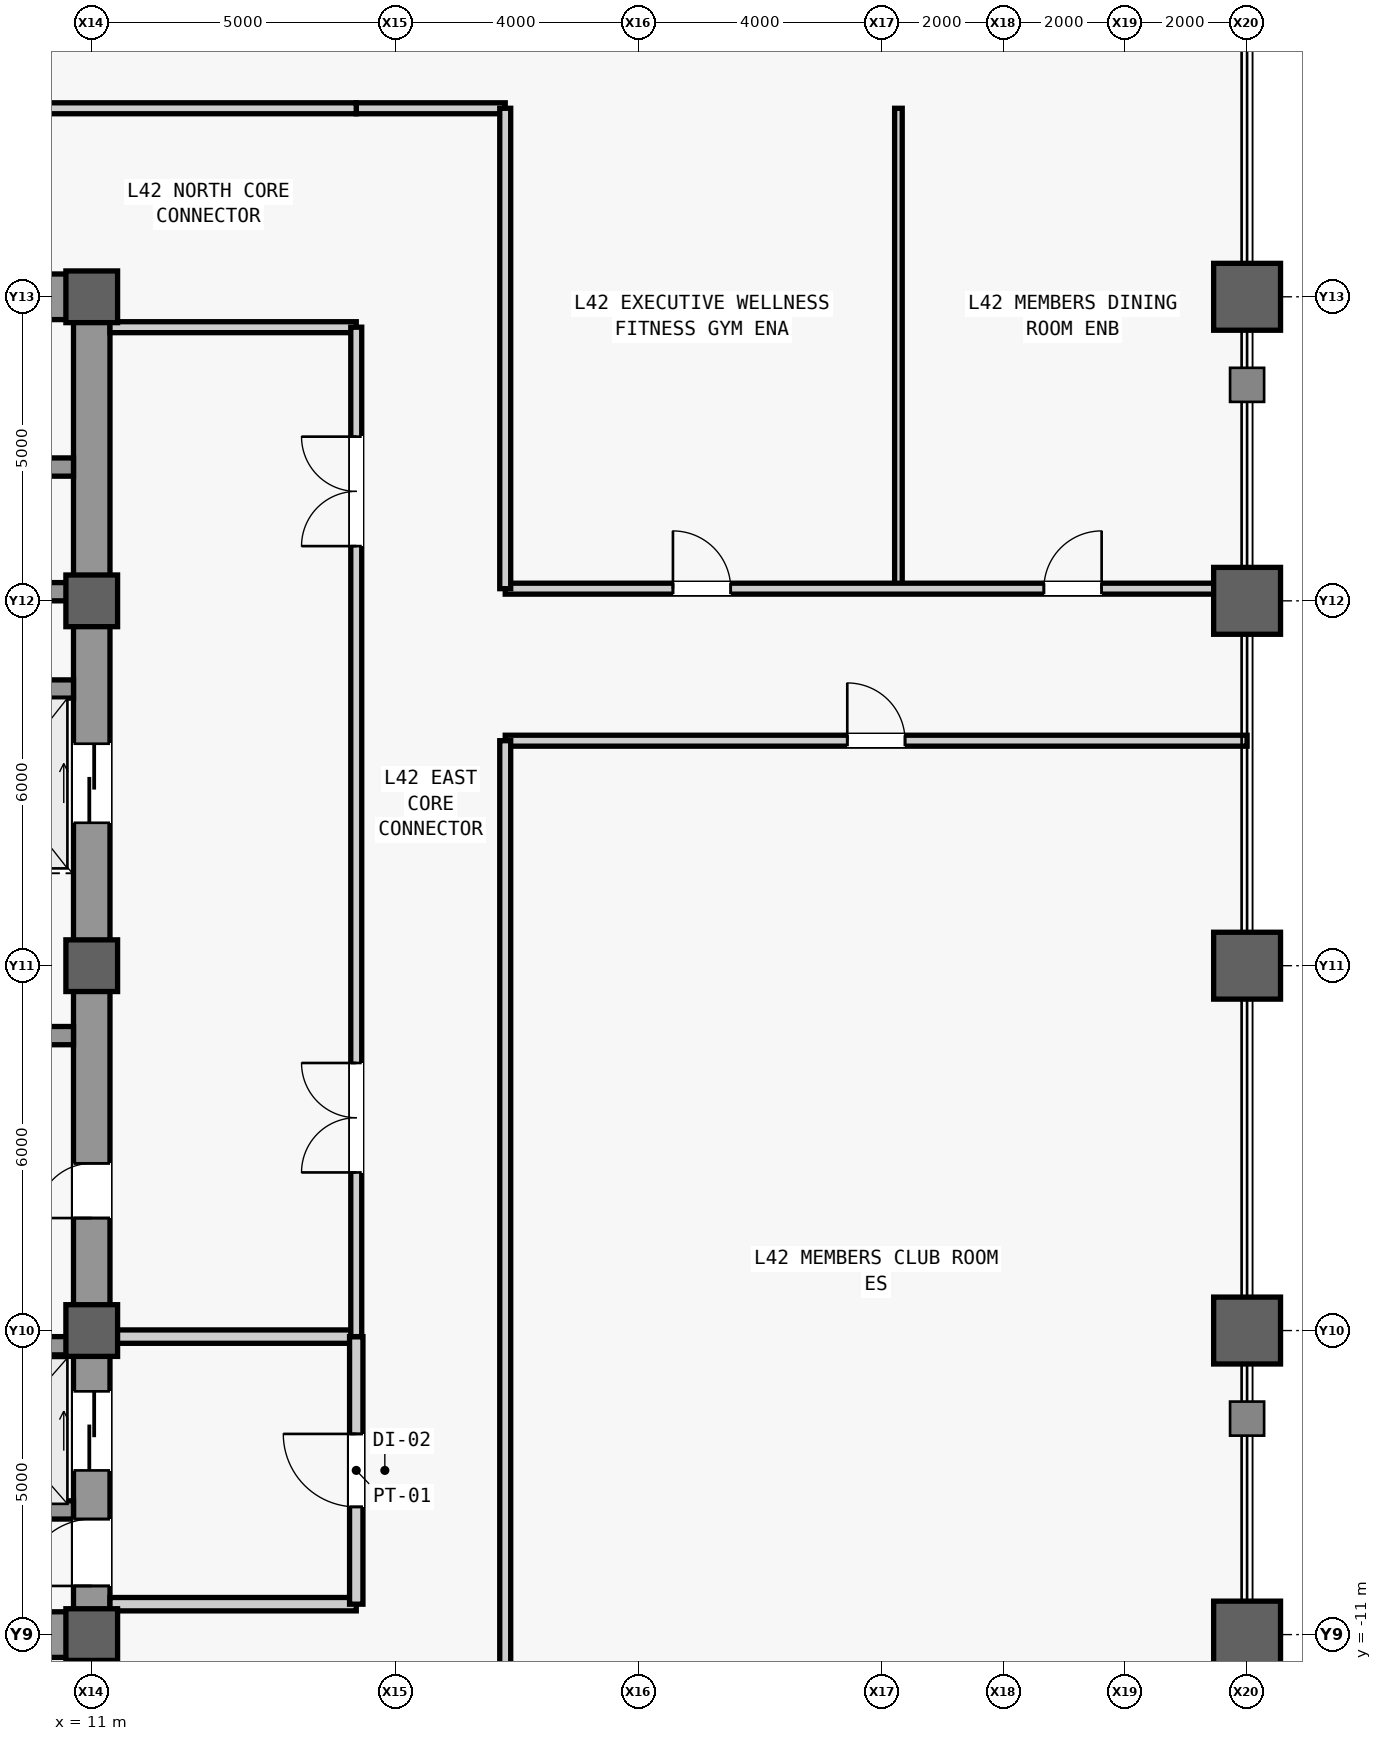
"""IFC4 building model, lengths in metres.
Left out: names, types, materials, properties, quantities, classifications, styles, units other than length and angle.
Written with IfcOpenShell. Run it as: python <this file> out.ifc"""

import sys

from ifc_helpers import new_model, si_unit, direction, frame, frame_2d, origin, origin_2d, place, context, subcontext, project, spatial, rectangle, hollow_rectangle, extrude, source, transform, mapped, element, fill, save


model = new_model("IFC4")
c1 = context("Model", 3, precision=1e-05, world=origin(), true_north=direction((0.0, 1.0)))
c2 = subcontext(c1, "Body", "Model", "MODEL_VIEW")
j1 = project(units=[si_unit("LENGTHUNIT", "METRE"), si_unit("PLANEANGLEUNIT", "RADIAN")], contexts=[c1])
p1 = place(None, origin())
s1 = spatial("IfcSite", under=j1, at=p1, CompositionType="ELEMENT")
p2 = place(p1, origin())
s2 = spatial("IfcBuilding", under=s1, at=p2, CompositionType="ELEMENT")
p3 = place(p2, frame((0.0, 0.0, 183.1)))
s3 = spatial("IfcBuildingStorey", under=s2, at=p3, CompositionType="ELEMENT", Elevation=183.1)
m1 = source(origin(), c2, "Body", "SweptSolid", [
    extrude(rectangle(XDim=22.0, YDim=0.6, at=frame_2d((11.0, 0.0))), origin(), (0.0, 0.0, 1.0), 3.78),
])
p4 = place(p3, frame((11.0, -11.0, 0.0), z_axis=(0.0, 0.0, 1.0), x_axis=(0.0, 1.0, 0.0)))
e1 = element("IfcWall", 1, at=p4, inside=s3, PredefinedType="SHEAR", context=c2, shape_type="MappedRepresentation", body=[
    mapped(m1, transform((0.0, 0.0, 0.0), scale=1.0)),
])
m2 = source(origin(), c2, "Body", "SweptSolid", [
    extrude(rectangle(XDim=1.1, YDim=2.2, at=frame_2d((0.55, 1.1))), frame((0.0, 0.31, 0.0), z_axis=(0.0, -1.0, 0.0), x_axis=(1.0, 0.0, 0.0)), (0.0, 0.0, 1.0), 0.62),
])
p5 = place(p4, frame((0.8, 0.0, 0.0)))
e2 = element("IfcOpeningElement", 2, at=p5, cuts=e1, PredefinedType="OPENING", context=c2, shape_type="MappedRepresentation", body=[
    mapped(m2, transform((0.0, 0.0, 0.0), scale=1.0)),
])
m3 = source(origin(), c2, "Body", "SweptSolid", [
    extrude(rectangle(XDim=0.9, YDim=2.15, at=frame_2d((0.45, 1.075))), frame((0.0, 0.31, 0.0), z_axis=(0.0, -1.0, 0.0), x_axis=(1.0, 0.0, 0.0)), (0.0, 0.0, 1.0), 0.62),
])
p6 = place(p4, frame((6.85, 0.0, 0.0)))
e3 = element("IfcOpeningElement", 3, at=p6, cuts=e1, PredefinedType="OPENING", context=c2, shape_type="MappedRepresentation", body=[
    mapped(m3, transform((0.0, 0.0, 0.0), scale=1.0)),
])
m4 = source(origin(), c2, "Body", "SweptSolid", [
    extrude(rectangle(XDim=1.3, YDim=2.3, at=frame_2d((0.65, 1.15))), frame((0.0, 0.31, 0.0), z_axis=(0.0, -1.0, 0.0), x_axis=(1.0, 0.0, 0.0)), (0.0, 0.0, 1.0), 0.62),
])
p7 = place(p4, frame((2.7, 0.0, 0.0)))
e4 = element("IfcOpeningElement", 4, at=p7, cuts=e1, PredefinedType="OPENING", context=c2, shape_type="MappedRepresentation", body=[
    mapped(m4, transform((0.0, 0.0, 0.0), scale=1.0)),
])
p8 = place(p4, frame((13.35, 0.0, 0.0)))
e5 = element("IfcOpeningElement", 5, at=p8, cuts=e1, PredefinedType="OPENING", context=c2, shape_type="MappedRepresentation", body=[
    mapped(m4, transform((0.0, 0.0, 0.0), scale=1.0)),
])
m5 = source(origin(), c2, "Body", "SweptSolid", [
    extrude(rectangle(XDim=5.85, YDim=0.75, at=frame_2d((2.925, 0.0))), origin(), (0.0, 0.0, 1.0), 3.78),
])
p9 = place(p3, frame((4.85, -11.0, 0.0), z_axis=(0.0, 0.0, 1.0), x_axis=(1.0, 0.0, 0.0)))
e6 = element("IfcWall", 6, at=p9, inside=s3, PredefinedType="SHEAR", context=c2, shape_type="MappedRepresentation", body=[
    mapped(m5, transform((0.0, 0.0, 0.0), scale=1.0)),
])
p10 = place(p3, frame((4.85, 11.0, 0.0), z_axis=(0.0, 0.0, 1.0), x_axis=(1.0, 0.0, 0.0)))
e7 = element("IfcWall", 7, at=p10, inside=s3, PredefinedType="SHEAR", context=c2, shape_type="MappedRepresentation", body=[
    mapped(m5, transform((0.0, 0.0, 0.0), scale=1.0)),
])
m6 = source(origin(), c2, "Body", "SweptSolid", [
    extrude(rectangle(XDim=1.05, YDim=2.2, at=frame_2d((0.525, 1.1))), frame((0.0, 0.385, 0.0), z_axis=(0.0, -1.0, 0.0), x_axis=(1.0, 0.0, 0.0)), (0.0, 0.0, 1.0), 0.77),
])
p11 = place(p10, frame((1.375, 0.0, 0.0)))
e8 = element("IfcOpeningElement", 8, at=p11, cuts=e7, PredefinedType="OPENING", context=c2, shape_type="MappedRepresentation", body=[
    mapped(m6, transform((0.0, 0.0, 0.0), scale=1.0)),
])
m7 = source(origin(), c2, "Body", "SweptSolid", [
    extrude(rectangle(XDim=5.6, YDim=0.3, at=frame_2d((2.8, 0.0))), origin(), (0.0, 0.0, 1.0), 3.78),
])
p12 = place(p3, frame((5.1, -1.15, 0.0), z_axis=(0.0, 0.0, 1.0), x_axis=(1.0, 0.0, 0.0)))
e9 = element("IfcWall", 9, at=p12, inside=s3, PredefinedType="SHEAR", context=c2, shape_type="MappedRepresentation", body=[
    mapped(m7, transform((0.0, 0.0, 0.0), scale=1.0)),
])
m8 = source(origin(), c2, "Body", "SweptSolid", [
    extrude(rectangle(XDim=0.85, YDim=0.85, at=origin_2d()), origin(), (0.0, 0.0, 1.0), 4.0),
])
for number, where, z_axis, x_axis in (
    (10, (11.0, -11.0, 0.0), (0.0, 0.0, 1.0), (1.0, 0.0, 0.0)),
    (11, (11.0, -6.0, 0.0), (0.0, 0.0, 1.0), (1.0, 0.0, 0.0)),
    (12, (11.0, 0.0, 0.0), (0.0, 0.0, 1.0), (1.0, 0.0, 0.0)),
    (13, (11.0, 6.0, 0.0), (0.0, 0.0, 1.0), (1.0, 0.0, 0.0)),
    (14, (11.0, 11.0, 0.0), (0.0, 0.0, 1.0), (1.0, 0.0, 0.0)),
):
    element("IfcColumn", number, at=place(p3, frame(where, z_axis=z_axis, x_axis=x_axis)), inside=s3, PredefinedType="COLUMN", context=c2, shape_type="MappedRepresentation", body=[
        mapped(m8, transform((0.0, 0.0, 0.0), scale=1.0)),
    ])
m9 = source(origin(), c2, "Body", "SweptSolid", [
    extrude(hollow_rectangle(XDim=1.1, YDim=1.1, WallThickness=0.06, at=origin_2d()), origin(), (0.0, 0.0, 1.0), 4.0),
])
for number, where, z_axis, x_axis in (
    (15, (30.0, -11.0, 0.0), (0.0, 0.0, 1.0), (1.0, 0.0, 0.0)),
    (16, (30.0, -6.0, 0.0), (0.0, 0.0, 1.0), (1.0, 0.0, 0.0)),
    (17, (30.0, 0.0, 0.0), (0.0, 0.0, 1.0), (1.0, 0.0, 0.0)),
    (18, (30.0, 6.0, 0.0), (0.0, 0.0, 1.0), (1.0, 0.0, 0.0)),
    (19, (30.0, 11.0, 0.0), (0.0, 0.0, 1.0), (1.0, 0.0, 0.0)),
):
    element("IfcColumn", number, at=place(p3, frame(where, z_axis=z_axis, x_axis=x_axis)), inside=s3, PredefinedType="COLUMN", context=c2, shape_type="MappedRepresentation", body=[
        mapped(m9, transform((0.0, 0.0, 0.0), scale=1.0)),
    ])
m10 = source(origin(), c2, "Body", "SweptSolid", [
    extrude(rectangle(XDim=2.2, YDim=0.3, at=frame_2d((1.1, 0.0))), origin(), (0.0, 0.0, 1.0), 3.78),
])
for number, where, z_axis, x_axis in (
    (20, (8.5, -8.95, 0.0), (0.0, 0.0, 1.0), (1.0, 0.0, 0.0)),
    (21, (8.5, -6.25, 0.0), (0.0, 0.0, 1.0), (1.0, 0.0, 0.0)),
):
    element("IfcWall", number, at=place(p3, frame(where, z_axis=z_axis, x_axis=x_axis)), inside=s3, PredefinedType="SHEAR", context=c2, shape_type="MappedRepresentation", body=[
        mapped(m10, transform((0.0, 0.0, 0.0), scale=1.0)),
    ])
m11 = source(origin(), c2, "Body", "SweptSolid", [
    extrude(rectangle(XDim=2.3, YDim=0.3, at=frame_2d((1.15, 0.0))), origin(), (0.0, 0.0, 1.0), 3.78),
])
for number, where, z_axis, x_axis in (
    (22, (8.4, 4.55, 0.0), (0.0, 0.0, 1.0), (1.0, 0.0, 0.0)),
    (23, (8.4, 6.15, 0.0), (0.0, 0.0, 1.0), (1.0, 0.0, 0.0)),
    (24, (8.4, 8.2, 0.0), (0.0, 0.0, 1.0), (1.0, 0.0, 0.0)),
):
    element("IfcWall", number, at=place(p3, frame(where, z_axis=z_axis, x_axis=x_axis)), inside=s3, PredefinedType="SHEAR", context=c2, shape_type="MappedRepresentation", body=[
        mapped(m11, transform((0.0, 0.0, 0.0), scale=1.0)),
    ])
m12 = source(origin(), c2, "Body", "SweptSolid", [
    extrude(rectangle(XDim=4.05, YDim=0.22, at=frame_2d((2.025, 0.0))), origin(), (0.0, 0.0, 1.0), 3.78),
])
p13 = place(p3, frame((11.3, -10.5, 0.0), z_axis=(0.0, 0.0, 1.0), x_axis=(1.0, 0.0, 0.0)))
e25 = element("IfcWall", 25, at=p13, inside=s3, PredefinedType="PARTITIONING", context=c2, shape_type="MappedRepresentation", body=[
    mapped(m12, transform((0.0, 0.0, 0.0), scale=1.0)),
])
m13 = source(origin(), c2, "Body", "SweptSolid", [
    extrude(rectangle(XDim=4.05, YDim=0.22, at=frame_2d((2.025, 0.0))), origin(), (0.0, 0.0, 1.0), 3.007),
])
p14 = place(p3, frame((11.3, -6.1, 0.0), z_axis=(0.0, 0.0, 1.0), x_axis=(1.0, 0.0, 0.0)))
e26 = element("IfcWall", 26, at=p14, inside=s3, PredefinedType="PARTITIONING", context=c2, shape_type="MappedRepresentation", body=[
    mapped(m13, transform((0.0, 0.0, 0.0), scale=1.0)),
])
m14 = source(origin(), c2, "Body", "SweptSolid", [
    extrude(rectangle(XDim=4.4, YDim=0.22, at=frame_2d((2.2, 0.0))), origin(), (0.0, 0.0, 1.0), 3.78),
])
p15 = place(p3, frame((15.35, -10.5, 0.0), z_axis=(0.0, 0.0, 1.0), x_axis=(0.0, 1.0, 0.0)))
e27 = element("IfcWall", 27, at=p15, inside=s3, PredefinedType="PARTITIONING", context=c2, shape_type="MappedRepresentation", body=[
    mapped(m14, transform((0.0, 0.0, 0.0), scale=1.0)),
])
m15 = source(origin(), c2, "Body", "SweptSolid", [
    extrude(rectangle(XDim=1.2, YDim=2.2, at=frame_2d((0.6, 1.1))), frame((0.0, 0.12, 0.0), z_axis=(0.0, -1.0, 0.0), x_axis=(1.0, 0.0, 0.0)), (0.0, 0.0, 1.0), 0.24),
])
p16 = place(p15, frame((1.6, 0.0, 0.0)))
e28 = element("IfcOpeningElement", 28, at=p16, cuts=e27, PredefinedType="OPENING", context=c2, shape_type="MappedRepresentation", body=[
    mapped(m15, transform((0.0, 0.0, 0.0), scale=1.0)),
])
m16 = source(origin(), c2, "Body", "SweptSolid", [
    extrude(rectangle(XDim=4.05, YDim=0.18, at=frame_2d((2.025, 0.0))), origin(), (0.0, 0.0, 1.0), 3.78),
])
p17 = place(p3, frame((11.3, 10.5, 0.0), z_axis=(0.0, 0.0, 1.0), x_axis=(1.0, 0.0, 0.0)))
e29 = element("IfcWall", 29, at=p17, inside=s3, PredefinedType="PARTITIONING", context=c2, shape_type="MappedRepresentation", body=[
    mapped(m16, transform((0.0, 0.0, 0.0), scale=1.0)),
])
m17 = source(origin(), c2, "Body", "SweptSolid", [
    extrude(rectangle(XDim=16.6, YDim=0.18, at=frame_2d((8.3, 0.0))), origin(), (0.0, 0.0, 1.0), 3.78),
])
p18 = place(p3, frame((15.35, -6.1, 0.0), z_axis=(0.0, 0.0, 1.0), x_axis=(0.0, 1.0, 0.0)))
e30 = element("IfcWall", 30, at=p18, inside=s3, PredefinedType="PARTITIONING", context=c2, shape_type="MappedRepresentation", body=[
    mapped(m17, transform((0.0, 0.0, 0.0), scale=1.0)),
])
m18 = source(origin(), c2, "Body", "SweptSolid", [
    extrude(rectangle(XDim=1.8, YDim=2.25, at=frame_2d((0.9, 1.125))), frame((0.0, 0.1, 0.0), z_axis=(0.0, -1.0, 0.0), x_axis=(1.0, 0.0, 0.0)), (0.0, 0.0, 1.0), 0.2),
])
p19 = place(p18, frame((2.7, 0.0, 0.0)))
e31 = element("IfcOpeningElement", 31, at=p19, cuts=e30, PredefinedType="OPENING", context=c2, shape_type="MappedRepresentation", body=[
    mapped(m18, transform((0.0, 0.0, 0.0), scale=1.0)),
])
p20 = place(p18, frame((13.0, 0.0, 0.0)))
e32 = element("IfcOpeningElement", 32, at=p20, cuts=e30, PredefinedType="OPENING", context=c2, shape_type="MappedRepresentation", body=[
    mapped(m18, transform((0.0, 0.0, 0.0), scale=1.0)),
])
m19 = source(origin(), c2, "Body", "SweptSolid", [
    extrude(rectangle(XDim=2.45, YDim=0.18, at=frame_2d((1.225, 0.0))), origin(), (0.0, 0.0, 1.0), 3.78),
])
p21 = place(p3, frame((15.35, 14.1, 0.0), z_axis=(0.0, 0.0, 1.0), x_axis=(1.0, 0.0, 0.0)))
e33 = element("IfcWall", 33, at=p21, inside=s3, PredefinedType="PARTITIONING", context=c2, shape_type="MappedRepresentation", body=[
    mapped(m19, transform((0.0, 0.0, 0.0), scale=1.0)),
])
m20 = source(origin(), c2, "Body", "SweptSolid", [
    extrude(rectangle(XDim=6.05, YDim=0.18, at=frame_2d((3.025, 0.0))), origin(), (0.0, 0.0, 1.0), 3.78),
])
p22 = place(p3, frame((9.3, 14.1, 0.0), z_axis=(0.0, 0.0, 1.0), x_axis=(1.0, 0.0, 0.0)))
e34 = element("IfcWall", 34, at=p22, inside=s3, PredefinedType="PARTITIONING", context=c2, shape_type="MappedRepresentation", body=[
    mapped(m20, transform((0.0, 0.0, 0.0), scale=1.0)),
])
m21 = source(origin(), c2, "Body", "SweptSolid", [
    extrude(rectangle(XDim=12.2, YDim=0.18, at=frame_2d((6.1, 0.0))), origin(), (0.0, 0.0, 1.0), 3.78),
])
p23 = place(p3, frame((17.8, 3.7, 0.0), z_axis=(0.0, 0.0, 1.0), x_axis=(1.0, 0.0, 0.0)))
e35 = element("IfcWall", 35, at=p23, inside=s3, PredefinedType="PARTITIONING", context=c2, shape_type="MappedRepresentation", body=[
    mapped(m21, transform((0.0, 0.0, 0.0), scale=1.0)),
])
m22 = source(origin(), c2, "Body", "SweptSolid", [
    extrude(rectangle(XDim=0.95, YDim=2.15, at=frame_2d((0.475, 1.075))), frame((0.0, 0.1, 0.0), z_axis=(0.0, -1.0, 0.0), x_axis=(1.0, 0.0, 0.0)), (0.0, 0.0, 1.0), 0.2),
])
p24 = place(p23, frame((5.625, 0.0, 0.0)))
e36 = element("IfcOpeningElement", 36, at=p24, cuts=e35, PredefinedType="OPENING", context=c2, shape_type="MappedRepresentation", body=[
    mapped(m22, transform((0.0, 0.0, 0.0), scale=1.0)),
])
m23 = source(origin(), c2, "Body", "SweptSolid", [
    extrude(rectangle(XDim=17.3, YDim=0.18, at=frame_2d((8.65, 0.0))), origin(), (0.0, 0.0, 1.0), 3.78),
])
p25 = place(p3, frame((17.8, -13.6, 0.0), z_axis=(0.0, 0.0, 1.0), x_axis=(0.0, 1.0, 0.0)))
e37 = element("IfcWall", 37, at=p25, inside=s3, PredefinedType="PARTITIONING", context=c2, shape_type="MappedRepresentation", body=[
    mapped(m23, transform((0.0, 0.0, 0.0), scale=1.0)),
])
m24 = source(origin(), c2, "Body", "SweptSolid", [
    extrude(rectangle(XDim=7.9, YDim=0.125, at=frame_2d((3.95, 0.0))), origin(), (0.0, 0.0, 1.0), 3.78),
])
p26 = place(p3, frame((24.266, 6.2, 0.0), z_axis=(0.0, 0.0, 1.0), x_axis=(0.0, 1.0, 0.0)))
e38 = element("IfcWall", 38, at=p26, inside=s3, PredefinedType="PARTITIONING", context=c2, shape_type="MappedRepresentation", body=[
    mapped(m24, transform((0.0, 0.0, 0.0), scale=1.0)),
])
m25 = source(origin(), c2, "Body", "SweptSolid", [
    extrude(rectangle(XDim=12.2, YDim=0.18, at=frame_2d((6.1, 0.0))), origin(), (0.0, 0.0, 1.0), 3.007),
])
p27 = place(p3, frame((17.8, 6.2, 0.0), z_axis=(0.0, 0.0, 1.0), x_axis=(1.0, 0.0, 0.0)))
e39 = element("IfcWall", 39, at=p27, inside=s3, PredefinedType="PARTITIONING", context=c2, shape_type="MappedRepresentation", body=[
    mapped(m25, transform((0.0, 0.0, 0.0), scale=1.0)),
])
p28 = place(p27, frame((2.758, 0.0, 0.0)))
e40 = element("IfcOpeningElement", 40, at=p28, cuts=e39, PredefinedType="OPENING", context=c2, shape_type="MappedRepresentation", body=[
    mapped(m22, transform((0.0, 0.0, 0.0), scale=1.0)),
])
p29 = place(p27, frame((8.858, 0.0, 0.0)))
e41 = element("IfcOpeningElement", 41, at=p29, cuts=e39, PredefinedType="OPENING", context=c2, shape_type="MappedRepresentation", body=[
    mapped(m22, transform((0.0, 0.0, 0.0), scale=1.0)),
])
m26 = source(origin(), c2, "Body", "SweptSolid", [
    extrude(rectangle(XDim=7.9, YDim=0.18, at=frame_2d((3.95, 0.0))), origin(), (0.0, 0.0, 1.0), 3.78),
])
p30 = place(p3, frame((17.8, 6.2, 0.0), z_axis=(0.0, 0.0, 1.0), x_axis=(0.0, 1.0, 0.0)))
e42 = element("IfcWall", 42, at=p30, inside=s3, PredefinedType="PARTITIONING", context=c2, shape_type="MappedRepresentation", body=[
    mapped(m26, transform((0.0, 0.0, 0.0), scale=1.0)),
])
m27 = source(origin(), c2, "Body", "SweptSolid", [
    extrude(rectangle(XDim=1.1, YDim=2.2, at=frame_2d((0.55, 1.1))), frame((0.0, 0.025, 0.0), z_axis=(0.0, -1.0, 0.0), x_axis=(1.0, 0.0, 0.0)), (0.0, 0.0, 1.0), 0.05),
])
p31 = place(p5, origin())
e43 = element("IfcDoor", 43, at=p31, inside=s3, OperationType="SINGLE_SWING_LEFT", PredefinedType="DOOR", context=c2, shape_type="MappedRepresentation", body=[
    mapped(m27, transform((0.0, 0.0, 0.0), scale=1.0)),
])
fill(e2, e43)
m28 = source(origin(), c2, "Body", "SweptSolid", [
    extrude(rectangle(XDim=0.9, YDim=2.15, at=frame_2d((0.45, 1.075))), frame((0.0, 0.025, 0.0), z_axis=(0.0, -1.0, 0.0), x_axis=(1.0, 0.0, 0.0)), (0.0, 0.0, 1.0), 0.05),
])
p32 = place(p6, origin())
e44 = element("IfcDoor", 44, at=p32, inside=s3, OperationType="SINGLE_SWING_LEFT", PredefinedType="DOOR", context=c2, shape_type="MappedRepresentation", body=[
    mapped(m28, transform((0.0, 0.0, 0.0), scale=1.0)),
])
fill(e3, e44)
m29 = source(origin(), c2, "Body", "SweptSolid", [
    extrude(rectangle(XDim=1.2, YDim=2.2, at=frame_2d((0.6, 1.1))), frame((0.0, 0.025, 0.0), z_axis=(0.0, -1.0, 0.0), x_axis=(1.0, 0.0, 0.0)), (0.0, 0.0, 1.0), 0.05),
])
p33 = place(p16, origin())
e45 = element("IfcDoor", 45, at=p33, inside=s3, OperationType="SINGLE_SWING_RIGHT", PredefinedType="DOOR", context=c2, shape_type="MappedRepresentation", body=[
    mapped(m29, transform((0.0, 0.0, 0.0), scale=1.0)),
])
fill(e28, e45)
m30 = source(origin(), c2, "Body", "SweptSolid", [
    extrude(rectangle(XDim=1.8, YDim=2.25, at=frame_2d((0.9, 1.125))), frame((0.0, 0.025, 0.0), z_axis=(0.0, -1.0, 0.0), x_axis=(1.0, 0.0, 0.0)), (0.0, 0.0, 1.0), 0.05),
])
p34 = place(p19, origin())
e46 = element("IfcDoor", 46, at=p34, inside=s3, OperationType="SINGLE_SWING_RIGHT", PredefinedType="DOOR", context=c2, shape_type="MappedRepresentation", body=[
    mapped(m30, transform((0.0, 0.0, 0.0), scale=1.0)),
])
fill(e31, e46)
p35 = place(p20, origin())
e47 = element("IfcDoor", 47, at=p35, inside=s3, OperationType="SINGLE_SWING_LEFT", PredefinedType="DOOR", context=c2, shape_type="MappedRepresentation", body=[
    mapped(m30, transform((0.0, 0.0, 0.0), scale=1.0)),
])
fill(e32, e47)
m31 = source(origin(), c2, "Body", "SweptSolid", [
    extrude(rectangle(XDim=0.95, YDim=2.15, at=frame_2d((0.475, 1.075))), frame((0.0, 0.025, 0.0), z_axis=(0.0, -1.0, 0.0), x_axis=(1.0, 0.0, 0.0)), (0.0, 0.0, 1.0), 0.05),
])
p36 = place(p24, origin())
e48 = element("IfcDoor", 48, at=p36, inside=s3, OperationType="SINGLE_SWING_LEFT", PredefinedType="DOOR", context=c2, shape_type="MappedRepresentation", body=[
    mapped(m31, transform((0.0, 0.0, 0.0), scale=1.0)),
])
fill(e36, e48)
p37 = place(p28, origin())
e49 = element("IfcDoor", 49, at=p37, inside=s3, OperationType="SINGLE_SWING_LEFT", PredefinedType="DOOR", context=c2, shape_type="MappedRepresentation", body=[
    mapped(m31, transform((0.0, 0.0, 0.0), scale=1.0)),
])
fill(e40, e49)
p38 = place(p29, origin())
e50 = element("IfcDoor", 50, at=p38, inside=s3, OperationType="SINGLE_SWING_RIGHT", PredefinedType="DOOR", context=c2, shape_type="MappedRepresentation", body=[
    mapped(m31, transform((0.0, 0.0, 0.0), scale=1.0)),
])
fill(e41, e50)
m32 = source(origin(), c2, "Body", "SweptSolid", [
    extrude(rectangle(XDim=1.3, YDim=2.3, at=frame_2d((0.65, 1.15))), frame((0.0, 0.025, 0.0), z_axis=(0.0, -1.0, 0.0), x_axis=(1.0, 0.0, 0.0)), (0.0, 0.0, 1.0), 0.05),
])
p39 = place(p7, origin())
e51 = element("IfcDoor", 51, at=p39, inside=s3, OperationType="SLIDING_TO_LEFT", PredefinedType="DOOR", context=c2, shape_type="MappedRepresentation", body=[
    mapped(m32, transform((0.0, 0.0, 0.0), scale=1.0)),
])
fill(e4, e51)
p40 = place(p8, origin())
e52 = element("IfcDoor", 52, at=p40, inside=s3, OperationType="SLIDING_TO_LEFT", PredefinedType="DOOR", context=c2, shape_type="MappedRepresentation", body=[
    mapped(m32, transform((0.0, 0.0, 0.0), scale=1.0)),
])
fill(e5, e52)
save(model, sys.argv[1])
